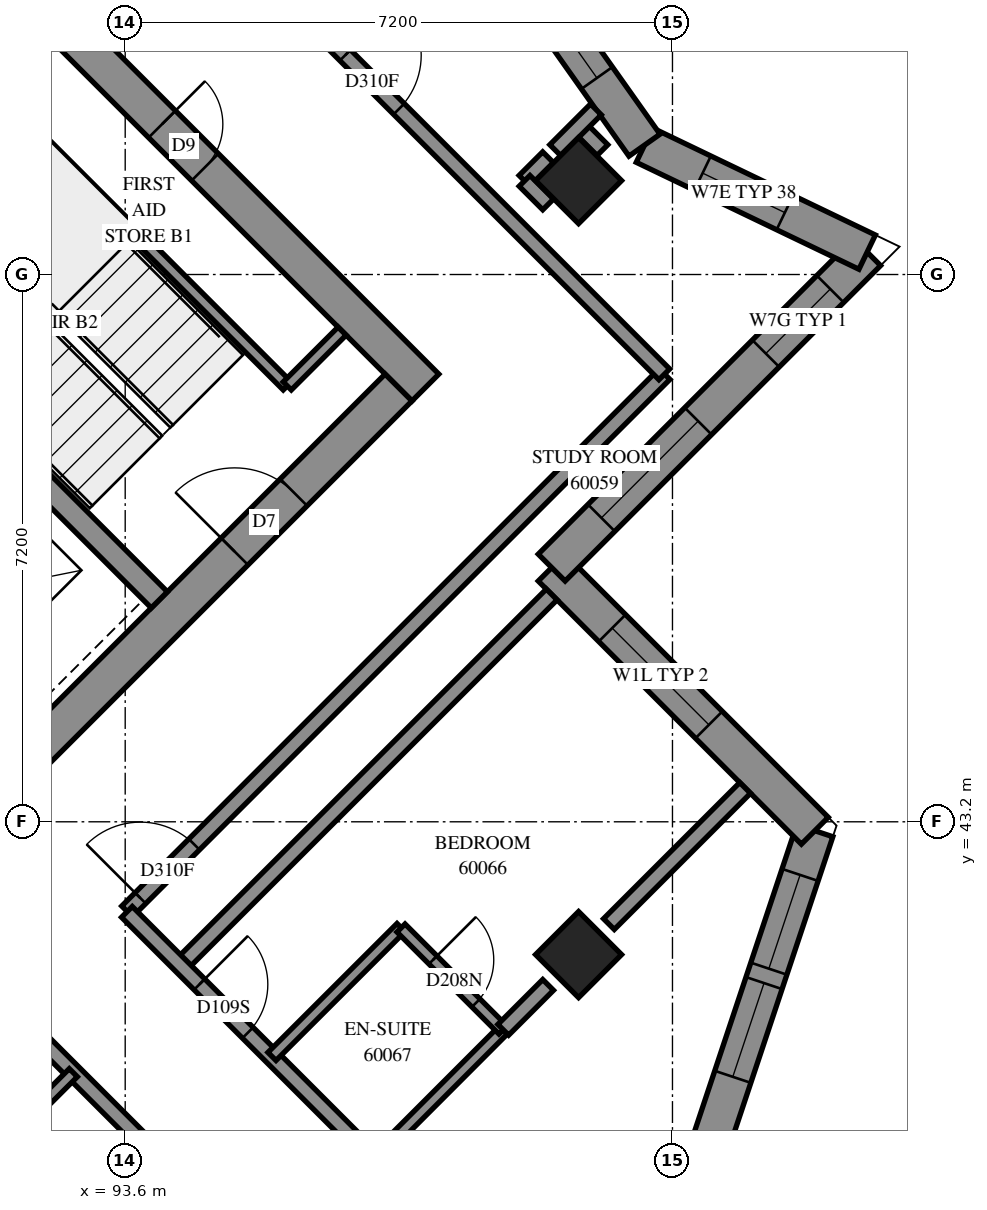
"""IFC4 building model, lengths in metres.
Left out: names, types, materials, properties, quantities, classifications, styles, units other than length and angle.
Written with IfcOpenShell. Run it as: python <this file> out.ifc"""

import sys

from ifc_helpers import new_model, si_unit, direction, frame, frame_2d, origin, origin_2d, place, context, subcontext, project, spatial, polyline, rectangle, outline, extrude, element, fill, save


model = new_model("IFC4")
c1 = context("Model", 3, precision=1e-05, world=origin(), true_north=direction((0.0, 1.0)))
c2 = subcontext(c1, "Body", "Model", "MODEL_VIEW")
j1 = project(units=[si_unit("LENGTHUNIT", "METRE"), si_unit("PLANEANGLEUNIT", "RADIAN")], contexts=[c1])
p1 = place(None, origin())
s1 = spatial("IfcSite", under=j1, at=p1, CompositionType="ELEMENT")
p2 = place(p1, origin())
s2 = spatial("IfcBuilding", under=s1, at=p2, CompositionType="ELEMENT")
p3 = place(p2, frame((0.0, 0.0, 220.2)))
s3 = spatial("IfcBuildingStorey", under=s2, at=p3, CompositionType="ELEMENT", Elevation=220.2)
for number, where, z_axis, x_axis in (
    (1, (99.565, 51.635, 0.0), (0.0, 0.0, 1.0), (0.707, -0.707, 0.0)),
    (2, (99.565, 41.453, 0.0), (0.0, 0.0, 1.0), (0.707, -0.707, 0.0)),
):
    element("IfcColumn", number, at=place(p3, frame(where, z_axis=z_axis, x_axis=x_axis)), inside=s3, PredefinedType="COLUMN", context=c2, shape_type="SweptSolid", body=[
        extrude(rectangle(XDim=0.8, YDim=0.8, at=origin_2d()), origin(), (0.0, 0.0, 1.0), 3.1),
    ])
p4 = place(p3, frame((86.66, 59.802, -0.3), z_axis=(0.0, 0.0, 1.0), x_axis=(0.7071067812, -0.7071067812, 0.0)))
e3 = element("IfcWall", 3, at=p4, inside=s3, PredefinedType="SHEAR", context=c2, shape_type="SweptSolid", body=[
    extrude(rectangle(XDim=15.4, YDim=0.5, at=frame_2d((7.7, 0.0))), origin(), (0.0, 0.0, 1.0), 2.7),
])
p5 = place(p4, frame((10.5, 0.0, 0.3)))
e4 = element("IfcOpeningElement", 4, at=p5, cuts=e3, PredefinedType="OPENING", context=c2, shape_type="SweptSolid", body=[
    extrude(rectangle(XDim=0.8, YDim=2.1, at=frame_2d((0.4, 1.05))), frame((0.0, 0.26, 0.0), z_axis=(0.0, -1.0, 0.0), x_axis=(1.0, 0.0, 0.0)), (0.0, 0.0, 1.0), 0.52),
])
p6 = place(p3, frame((87.013, 38.731, -0.3), z_axis=(0.0, 0.0, 1.0), x_axis=(0.7071067812, 0.7071067812, 0.0)))
e5 = element("IfcWall", 5, at=p6, inside=s3, PredefinedType="SHEAR", context=c2, shape_type="SweptSolid", body=[
    extrude(rectangle(XDim=14.4, YDim=0.5, at=frame_2d((7.2, 0.0))), origin(), (0.0, 0.0, 1.0), 2.7),
])
p7 = place(p6, frame((4.55, 0.0, 0.3)))
e6 = element("IfcOpeningElement", 6, at=p7, cuts=e5, PredefinedType="OPENING", context=c2, shape_type="SweptSolid", body=[
    extrude(rectangle(XDim=1.1, YDim=2.1, at=frame_2d((0.55, 1.05))), frame((0.0, 0.26, 0.0), z_axis=(0.0, -1.0, 0.0), x_axis=(1.0, 0.0, 0.0)), (0.0, 0.0, 1.0), 0.52),
])
p8 = place(p6, frame((11.35, 0.0, 0.3)))
e7 = element("IfcOpeningElement", 7, at=p8, cuts=e5, PredefinedType="OPENING", context=c2, shape_type="SweptSolid", body=[
    extrude(rectangle(XDim=1.1, YDim=2.1, at=frame_2d((0.55, 1.05))), frame((0.0, 0.26, 0.0), z_axis=(0.0, -1.0, 0.0), x_axis=(1.0, 0.0, 0.0)), (0.0, 0.0, 1.0), 0.52),
])
p9 = place(p3, frame((88.958, 51.211, 0.0), z_axis=(0.0, 0.0, 1.0), x_axis=(0.7070998367, -0.7071137256, 0.0)))
e8 = element("IfcWall", 8, at=p9, inside=s3, PredefinedType="SOLIDWALL", context=c2, shape_type="SweptSolid", body=[
    extrude(rectangle(XDim=7.2, YDim=0.3, at=frame_2d((3.6, 0.0))), origin(), (0.0, 0.0, 1.0), 3.1),
])
p10 = place(p3, frame((101.062, 38.252, 0.0), z_axis=(0.0, 0.0, 1.0), x_axis=(0.3162395484, 0.9486793705, 0.0)))
e9 = element("IfcWall", 9, at=p10, inside=s3, PredefinedType="SOLIDWALL", context=c2, shape_type="SweptSolid", body=[
    extrude(outline(polyline([(-0.12, -0.25), (5.247, -0.25), (4.938, 0.25), (0.12, 0.25), (-0.12, -0.25)])), origin(), (0.0, 0.0, 1.0), 3.1),
])
p11 = place(p10, frame((1.68, 0.0, 0.45)))
e10 = element("IfcOpeningElement", 10, at=p11, cuts=e9, PredefinedType="OPENING", context=c2, shape_type="SweptSolid", body=[
    extrude(rectangle(XDim=1.3, YDim=2.5, at=frame_2d((0.65, 1.25))), frame((0.0, 0.26, 0.0), z_axis=(0.0, -1.0, 0.0), x_axis=(1.0, 0.0, 0.0)), (0.0, 0.0, 1.0), 0.52),
])
p12 = place(p10, frame((3.18, 0.0, 0.45)))
e11 = element("IfcOpeningElement", 11, at=p12, cuts=e9, PredefinedType="OPENING", context=c2, shape_type="SweptSolid", body=[
    extrude(rectangle(XDim=1.3, YDim=2.5, at=frame_2d((0.65, 1.25))), frame((0.0, 0.26, 0.0), z_axis=(0.0, -1.0, 0.0), x_axis=(1.0, 0.0, 0.0)), (0.0, 0.0, 1.0), 0.52),
])
p13 = place(p3, frame((102.673, 43.083, 0.0), z_axis=(0.0, 0.0, 1.0), x_axis=(-0.7071067812, 0.7071067812, 0.0)))
e12 = element("IfcWall", 12, at=p13, inside=s3, PredefinedType="SOLIDWALL", context=c2, shape_type="SweptSolid", body=[
    extrude(outline(polyline([(-0.154, -0.25), (4.646, -0.25), (5.146, 0.25), (0.154, 0.25), (-0.154, -0.25)])), origin(), (0.0, 0.0, 1.0), 3.1),
])
p14 = place(p13, frame((1.97, 0.0, 0.6)))
e13 = element("IfcOpeningElement", 13, at=p14, cuts=e12, PredefinedType="OPENING", context=c2, shape_type="SweptSolid", body=[
    extrude(rectangle(XDim=1.8, YDim=1.9, at=frame_2d((0.9, 0.95))), frame((0.0, 0.26, 0.0), z_axis=(0.0, -1.0, 0.0), x_axis=(1.0, 0.0, 0.0)), (0.0, 0.0, 1.0), 0.52),
])
p15 = place(p3, frame((99.211, 46.544, 0.0), z_axis=(0.0, 0.0, 1.0), x_axis=(0.7071067812, 0.7071067812, 0.0)))
e14 = element("IfcWall", 14, at=p15, inside=s3, PredefinedType="SOLIDWALL", context=c2, shape_type="SweptSolid", body=[
    extrude(outline(polyline([(0.25, -0.25), (6.222, -0.25), (5.516, 0.25), (-0.25, 0.25), (0.25, -0.25)])), origin(), (0.0, 0.0, 1.0), 3.1),
])
p16 = place(p15, frame((0.925, 0.0, 0.6)))
e15 = element("IfcOpeningElement", 15, at=p16, cuts=e14, PredefinedType="OPENING", context=c2, shape_type="SweptSolid", body=[
    extrude(rectangle(XDim=1.8, YDim=1.9, at=frame_2d((0.9, 0.95))), frame((0.0, 0.26, 0.0), z_axis=(0.0, -1.0, 0.0), x_axis=(1.0, 0.0, 0.0)), (0.0, 0.0, 1.0), 0.52),
])
p17 = place(p15, frame((3.983, 0.0, 0.6)))
e16 = element("IfcOpeningElement", 16, at=p17, cuts=e14, PredefinedType="OPENING", context=c2, shape_type="SweptSolid", body=[
    extrude(rectangle(XDim=1.2, YDim=1.9, at=frame_2d((0.6, 0.95))), frame((0.0, 0.26, 0.0), z_axis=(0.0, -1.0, 0.0), x_axis=(1.0, 0.0, 0.0)), (0.0, 0.0, 1.0), 0.52),
])
p18 = place(p3, frame((103.361, 50.694, 0.0), z_axis=(0.0, 0.0, 1.0), x_axis=(-0.9014217251, 0.4329421133, 0.0)))
e17 = element("IfcWall", 17, at=p18, inside=s3, PredefinedType="SOLIDWALL", context=c2, shape_type="SweptSolid", body=[
    extrude(outline(polyline([(-0.353, -0.25), (3.185, -0.25), (3.315, 0.25), (0.353, 0.25), (-0.353, -0.25)])), origin(), (0.0, 0.0, 1.0), 3.1),
])
p19 = place(p18, frame((1.201, 0.0, 0.45)))
e18 = element("IfcOpeningElement", 18, at=p19, cuts=e17, PredefinedType="OPENING", context=c2, shape_type="SweptSolid", body=[
    extrude(rectangle(XDim=1.2, YDim=2.5, at=frame_2d((0.6, 1.25))), frame((0.0, 0.26, 0.0), z_axis=(0.0, -1.0, 0.0), x_axis=(1.0, 0.0, 0.0)), (0.0, 0.0, 1.0), 0.52),
])
p20 = place(p3, frame((100.432, 52.102, 0.0), z_axis=(0.0, 0.0, 1.0), x_axis=(-0.5775248088, 0.8163731348, 0.0)))
e19 = element("IfcWall", 19, at=p20, inside=s3, PredefinedType="SOLIDWALL", context=c2, shape_type="SweptSolid", body=[
    extrude(outline(polyline([(0.065, -0.25), (3.452, -0.25), (3.366, 0.25), (-0.065, 0.25), (0.065, -0.25)])), origin(), (0.0, 0.0, 1.0), 3.1),
])
p21 = place(p20, frame((1.083, 0.0, 0.45)))
e20 = element("IfcOpeningElement", 20, at=p21, cuts=e19, PredefinedType="OPENING", context=c2, shape_type="SweptSolid", body=[
    extrude(rectangle(XDim=1.2, YDim=2.5, at=frame_2d((0.6, 1.25))), frame((0.0, 0.26, 0.0), z_axis=(0.0, -1.0, 0.0), x_axis=(1.0, 0.0, 0.0)), (0.0, 0.0, 1.0), 0.52),
])
p22 = place(p3, frame((91.313, 53.354, 0.0), z_axis=(0.0, 0.0, 1.0), x_axis=(0.7071147811, -0.7070987812, 0.0)))
e21 = element("IfcWall", 21, at=p22, inside=s3, PredefinedType="PARTITIONING", context=c2, shape_type="SweptSolid", body=[
    extrude(rectangle(XDim=6.25, YDim=0.15, at=frame_2d((3.125, 0.0))), origin(), (0.0, 0.0, 1.0), 3.1),
])
p23 = place(p3, frame((95.732, 48.934, 0.0), z_axis=(0.0, 0.0, 1.0), x_axis=(0.7071067812, 0.7071067812, 0.0)))
e22 = element("IfcWall", 22, at=p23, inside=s3, PredefinedType="PARTITIONING", context=c2, shape_type="SweptSolid", body=[
    extrude(rectangle(XDim=1.02, YDim=0.15, at=frame_2d((0.51, 0.0))), origin(), (0.0, 0.0, 1.0), 3.1),
])
p24 = place(p3, frame((93.625, 42.021, 0.0), z_axis=(0.0, 0.0, 1.0), x_axis=(0.7071067812, 0.7071067812, 0.0)))
e23 = element("IfcWall", 23, at=p24, inside=s3, PredefinedType="PARTITIONING", context=c2, shape_type="SweptSolid", body=[
    extrude(rectangle(XDim=9.998, YDim=0.2, at=frame_2d((4.999, 0.0))), origin(), (0.0, 0.0, 1.0), 3.1),
])
p25 = place(p24, frame((0.248, 0.0, 0.0)))
e24 = element("IfcOpeningElement", 24, at=p25, cuts=e23, PredefinedType="OPENING", context=c2, shape_type="SweptSolid", body=[
    extrude(rectangle(XDim=1.0, YDim=2.1, at=frame_2d((0.5, 1.05))), frame((0.0, 0.11, 0.0), z_axis=(0.0, -1.0, 0.0), x_axis=(1.0, 0.0, 0.0)), (0.0, 0.0, 1.0), 0.22),
])
p26 = place(p3, frame((94.331, 41.313, 0.0), z_axis=(0.0, 0.0, 1.0), x_axis=(0.7072516979, 0.7069618347, 0.0)))
e25 = element("IfcWall", 25, at=p26, inside=s3, PredefinedType="PARTITIONING", context=c2, shape_type="SweptSolid", body=[
    extrude(rectangle(XDim=6.9, YDim=0.2, at=frame_2d((3.45, 0.0))), origin(), (0.0, 0.0, 1.0), 3.1),
])
p27 = place(p3, frame((96.309, 53.471, 0.0), z_axis=(0.0, 0.0, 1.0), x_axis=(0.7071067812, -0.7071067812, 0.0)))
e26 = element("IfcWall", 26, at=p27, inside=s3, PredefinedType="PARTITIONING", context=c2, shape_type="SweptSolid", body=[
    extrude(rectangle(XDim=6.2, YDim=0.2, at=frame_2d((3.1, 0.0))), origin(), (0.0, 0.0, 1.0), 3.1),
])
p28 = place(p27, frame((0.263, 0.0, 0.0)))
e27 = element("IfcOpeningElement", 27, at=p28, cuts=e26, PredefinedType="OPENING", context=c2, shape_type="SweptSolid", body=[
    extrude(rectangle(XDim=1.0, YDim=2.1, at=frame_2d((0.5, 1.05))), frame((0.0, 0.11, 0.0), z_axis=(0.0, -1.0, 0.0), x_axis=(1.0, 0.0, 0.0)), (0.0, 0.0, 1.0), 0.22),
])
p29 = place(p3, frame((93.623, 42.015, 0.0), z_axis=(0.0, 0.0, 1.0), x_axis=(0.7071067812, -0.7071067812, 0.0)))
e28 = element("IfcWall", 28, at=p29, inside=s3, PredefinedType="PARTITIONING", context=c2, shape_type="SweptSolid", body=[
    extrude(rectangle(XDim=4.599, YDim=0.2, at=frame_2d((2.3, 0.0))), origin(), (0.0, 0.0, 1.0), 3.1),
])
p30 = place(p29, frame((1.349, 0.0, 0.0)))
e29 = element("IfcOpeningElement", 29, at=p30, cuts=e28, PredefinedType="OPENING", context=c2, shape_type="SweptSolid", body=[
    extrude(rectangle(XDim=0.9, YDim=2.1, at=frame_2d((0.45, 1.05))), frame((0.0, 0.11, 0.0), z_axis=(0.0, -1.0, 0.0), x_axis=(1.0, 0.0, 0.0)), (0.0, 0.0, 1.0), 0.22),
])
p31 = place(p3, frame((92.216, 40.608, 0.0), z_axis=(0.0, 0.0, 1.0), x_axis=(0.7071067812, -0.7071067812, 0.0)))
e30 = element("IfcWall", 30, at=p31, inside=s3, PredefinedType="PARTITIONING", context=c2, shape_type="SweptSolid", body=[
    extrude(rectangle(XDim=4.599, YDim=0.2, at=frame_2d((2.3, 0.0))), origin(), (0.0, 0.0, 1.0), 3.1),
])
p32 = place(p31, frame((3.189, 0.0, 0.0)))
e31 = element("IfcOpeningElement", 31, at=p32, cuts=e30, PredefinedType="OPENING", context=c2, shape_type="SweptSolid", body=[
    extrude(rectangle(XDim=0.9, YDim=2.1, at=frame_2d((0.45, 1.05))), frame((0.0, 0.11, 0.0), z_axis=(0.0, -1.0, 0.0), x_axis=(1.0, 0.0, 0.0)), (0.0, 0.0, 1.0), 0.22),
])
p33 = place(p3, frame((99.964, 41.854, 0.0), z_axis=(0.0, 0.0, 1.0), x_axis=(0.7071265121, 0.7070870497, 0.0)))
e32 = element("IfcWall", 32, at=p33, inside=s3, PredefinedType="PARTITIONING", context=c2, shape_type="SweptSolid", body=[
    extrude(rectangle(XDim=2.534, YDim=0.2, at=frame_2d((1.267, 0.0))), origin(), (0.0, 0.0, 1.0), 3.1),
])
p34 = place(p3, frame((91.219, 38.201, 0.0), z_axis=(0.0, 0.0, 1.0), x_axis=(0.7071067812, 0.7071067812, 0.0)))
e33 = element("IfcWall", 33, at=p34, inside=s3, PredefinedType="PARTITIONING", context=c2, shape_type="SweptSolid", body=[
    extrude(rectangle(XDim=2.401, YDim=0.15, at=frame_2d((1.201, 0.0))), origin(), (0.0, 0.0, 1.0), 3.1),
])
p35 = place(p3, frame((96.879, 38.764, 0.0), z_axis=(0.0, 0.0, 1.0), x_axis=(0.706689978, 0.7075233388, 0.0)))
e34 = element("IfcWall", 34, at=p35, inside=s3, PredefinedType="PARTITIONING", context=c2, shape_type="SweptSolid", body=[
    extrude(rectangle(XDim=2.4, YDim=0.15, at=frame_2d((1.2, 0.0))), origin(), (0.0, 0.0, 1.0), 2.6),
])
p36 = place(p3, frame((95.531, 40.113, 0.0), z_axis=(0.0, 0.0, 1.0), x_axis=(0.7075233388, 0.706689978, 0.0)))
e35 = element("IfcWall", 35, at=p36, inside=s3, PredefinedType="PARTITIONING", context=c2, shape_type="SweptSolid", body=[
    extrude(rectangle(XDim=2.4, YDim=0.15, at=frame_2d((1.2, 0.0))), origin(), (0.0, 0.0, 1.0), 3.1),
])
p37 = place(p3, frame((97.229, 41.803, 0.0), z_axis=(0.0, 0.0, 1.0), x_axis=(0.7071067812, -0.7071067812, 0.0)))
e36 = element("IfcWall", 36, at=p37, inside=s3, PredefinedType="PARTITIONING", context=c2, shape_type="SweptSolid", body=[
    extrude(rectangle(XDim=1.898, YDim=0.15, at=frame_2d((0.949, 0.0))), origin(), (0.0, 0.0, 1.0), 3.1),
])
p38 = place(p37, frame((0.594, 0.0, 0.0)))
e37 = element("IfcOpeningElement", 37, at=p38, cuts=e36, PredefinedType="OPENING", context=c2, shape_type="SweptSolid", body=[
    extrude(rectangle(XDim=0.8, YDim=2.1, at=frame_2d((0.4, 1.05))), frame((0.0, 0.085, 0.0), z_axis=(0.0, -1.0, 0.0), x_axis=(1.0, 0.0, 0.0)), (0.0, 0.0, 1.0), 0.17),
])
p39 = place(p3, frame((98.574, 40.464, 0.0), z_axis=(0.0, 0.0, 1.0), x_axis=(0.7071067812, 0.7071067812, 0.0)))
e38 = element("IfcWall", 38, at=p39, inside=s3, PredefinedType="PARTITIONING", context=c2, shape_type="SweptSolid", body=[
    extrude(rectangle(XDim=0.834, YDim=0.2, at=frame_2d((0.417, 0.0))), origin(), (0.0, 0.0, 1.0), 2.6),
])
for number, where, z_axis, x_axis in (
    (39, (98.853, 51.633, 0.0), (0.0, 0.0, 1.0), (0.707, 0.707, 0.0)),
    (40, (98.854, 51.632, 0.0), (0.0, 0.0, 1.0), (0.707, -0.707, 0.0)),
    (41, (99.568, 52.346, 0.0), (0.0, 0.0, 1.0), (0.707, -0.707, 0.0)),
):
    element("IfcWall", number, at=place(p3, frame(where, z_axis=z_axis, x_axis=x_axis)), inside=s3, PredefinedType="PARTITIONING", context=c2, shape_type="SweptSolid", body=[
        extrude(rectangle(XDim=0.438, YDim=0.2, at=frame_2d((0.219, 0.0))), origin(), (0.0, 0.0, 1.0), 3.1),
    ])
p40 = place(p3, frame((99.257, 52.037, 0.0), z_axis=(0.0, 0.0, 1.0), x_axis=(0.7071067812, 0.7071067812, 0.0)))
e42 = element("IfcWall", 42, at=p40, inside=s3, PredefinedType="PARTITIONING", context=c2, shape_type="SweptSolid", body=[
    extrude(rectangle(XDim=0.757, YDim=0.2, at=frame_2d((0.379, 0.0))), origin(), (0.0, 0.0, 1.0), 3.1),
])
p41 = place(p11, origin())
e43 = element("IfcWindow", 43, at=p41, inside=s3, PartitioningType="SINGLE_PANEL", PredefinedType="WINDOW", context=c2, shape_type="SweptSolid", body=[
    extrude(rectangle(XDim=1.3, YDim=2.5, at=frame_2d((0.65, 1.25))), frame((0.0, 0.18, 0.0), z_axis=(0.0, -1.0, 0.0), x_axis=(1.0, 0.0, 0.0)), (0.0, 0.0, 1.0), 0.06),
])
fill(e10, e43)
p42 = place(p12, origin())
e44 = element("IfcWindow", 44, at=p42, inside=s3, PartitioningType="SINGLE_PANEL", PredefinedType="WINDOW", context=c2, shape_type="SweptSolid", body=[
    extrude(rectangle(XDim=1.3, YDim=2.5, at=frame_2d((0.65, 1.25))), frame((0.0, 0.18, 0.0), z_axis=(0.0, -1.0, 0.0), x_axis=(1.0, 0.0, 0.0)), (0.0, 0.0, 1.0), 0.06),
])
fill(e11, e44)
p43 = place(p14, origin())
e45 = element("IfcWindow", 45, at=p43, inside=s3, PartitioningType="SINGLE_PANEL", PredefinedType="WINDOW", context=c2, shape_type="SweptSolid", body=[
    extrude(rectangle(XDim=1.8, YDim=1.9, at=frame_2d((0.9, 0.95))), frame((0.0, 0.18, 0.0), z_axis=(0.0, -1.0, 0.0), x_axis=(1.0, 0.0, 0.0)), (0.0, 0.0, 1.0), 0.06),
])
fill(e13, e45)
p44 = place(p16, origin())
e46 = element("IfcWindow", 46, at=p44, inside=s3, PartitioningType="SINGLE_PANEL", PredefinedType="WINDOW", context=c2, shape_type="SweptSolid", body=[
    extrude(rectangle(XDim=1.8, YDim=1.9, at=frame_2d((0.9, 0.95))), frame((0.0, 0.18, 0.0), z_axis=(0.0, -1.0, 0.0), x_axis=(1.0, 0.0, 0.0)), (0.0, 0.0, 1.0), 0.06),
])
fill(e15, e46)
p45 = place(p17, origin())
e47 = element("IfcWindow", 47, at=p45, inside=s3, PartitioningType="SINGLE_PANEL", PredefinedType="WINDOW", context=c2, shape_type="SweptSolid", body=[
    extrude(rectangle(XDim=1.2, YDim=1.9, at=frame_2d((0.6, 0.95))), frame((0.0, 0.18, 0.0), z_axis=(0.0, -1.0, 0.0), x_axis=(1.0, 0.0, 0.0)), (0.0, 0.0, 1.0), 0.06),
])
fill(e16, e47)
p46 = place(p19, origin())
e48 = element("IfcWindow", 48, at=p46, inside=s3, PartitioningType="SINGLE_PANEL", PredefinedType="WINDOW", context=c2, shape_type="SweptSolid", body=[
    extrude(rectangle(XDim=1.2, YDim=2.5, at=frame_2d((0.6, 1.25))), frame((0.0, 0.18, 0.0), z_axis=(0.0, -1.0, 0.0), x_axis=(1.0, 0.0, 0.0)), (0.0, 0.0, 1.0), 0.06),
])
fill(e18, e48)
p47 = place(p21, origin())
e49 = element("IfcWindow", 49, at=p47, inside=s3, PartitioningType="SINGLE_PANEL", PredefinedType="WINDOW", context=c2, shape_type="SweptSolid", body=[
    extrude(rectangle(XDim=1.2, YDim=2.5, at=frame_2d((0.6, 1.25))), frame((0.0, 0.18, 0.0), z_axis=(0.0, -1.0, 0.0), x_axis=(1.0, 0.0, 0.0)), (0.0, 0.0, 1.0), 0.06),
])
fill(e20, e49)
p48 = place(p5, origin())
e50 = element("IfcDoor", 50, at=p48, inside=s3, OperationType="SINGLE_SWING_RIGHT", PredefinedType="DOOR", context=c2, shape_type="SweptSolid", body=[
    extrude(rectangle(XDim=0.8, YDim=2.1, at=frame_2d((0.4, 1.05))), frame((0.0, 0.025, 0.0), z_axis=(0.0, -1.0, 0.0), x_axis=(1.0, 0.0, 0.0)), (0.0, 0.0, 1.0), 0.05),
])
fill(e4, e50)
p49 = place(p8, origin())
e51 = element("IfcDoor", 51, at=p49, inside=s3, OperationType="SINGLE_SWING_RIGHT", PredefinedType="DOOR", context=c2, shape_type="SweptSolid", body=[
    extrude(rectangle(XDim=1.1, YDim=2.1, at=frame_2d((0.55, 1.05))), frame((0.0, 0.025, 0.0), z_axis=(0.0, -1.0, 0.0), x_axis=(1.0, 0.0, 0.0)), (0.0, 0.0, 1.0), 0.05),
])
fill(e7, e51)
p50 = place(p25, origin())
e52 = element("IfcDoor", 52, at=p50, inside=s3, OperationType="SINGLE_SWING_LEFT", PredefinedType="DOOR", context=c2, shape_type="SweptSolid", body=[
    extrude(rectangle(XDim=1.0, YDim=2.1, at=frame_2d((0.5, 1.05))), frame((0.0, 0.025, 0.0), z_axis=(0.0, -1.0, 0.0), x_axis=(1.0, 0.0, 0.0)), (0.0, 0.0, 1.0), 0.05),
])
fill(e24, e52)
p51 = place(p28, origin())
e53 = element("IfcDoor", 53, at=p51, inside=s3, OperationType="SINGLE_SWING_LEFT", PredefinedType="DOOR", context=c2, shape_type="SweptSolid", body=[
    extrude(rectangle(XDim=1.0, YDim=2.1, at=frame_2d((0.5, 1.05))), frame((0.0, 0.025, 0.0), z_axis=(0.0, -1.0, 0.0), x_axis=(1.0, 0.0, 0.0)), (0.0, 0.0, 1.0), 0.05),
])
fill(e27, e53)
p52 = place(p30, origin())
e54 = element("IfcDoor", 54, at=p52, inside=s3, OperationType="SINGLE_SWING_RIGHT", PredefinedType="DOOR", context=c2, shape_type="SweptSolid", body=[
    extrude(rectangle(XDim=0.9, YDim=2.1, at=frame_2d((0.45, 1.05))), frame((0.0, 0.025, 0.0), z_axis=(0.0, -1.0, 0.0), x_axis=(1.0, 0.0, 0.0)), (0.0, 0.0, 1.0), 0.05),
])
fill(e29, e54)
p53 = place(p38, origin())
e55 = element("IfcDoor", 55, at=p53, inside=s3, OperationType="SINGLE_SWING_RIGHT", PredefinedType="DOOR", context=c2, shape_type="SweptSolid", body=[
    extrude(rectangle(XDim=0.8, YDim=2.1, at=frame_2d((0.4, 1.05))), frame((0.0, 0.025, 0.0), z_axis=(0.0, -1.0, 0.0), x_axis=(1.0, 0.0, 0.0)), (0.0, 0.0, 1.0), 0.05),
])
fill(e37, e55)
save(model, sys.argv[1])
